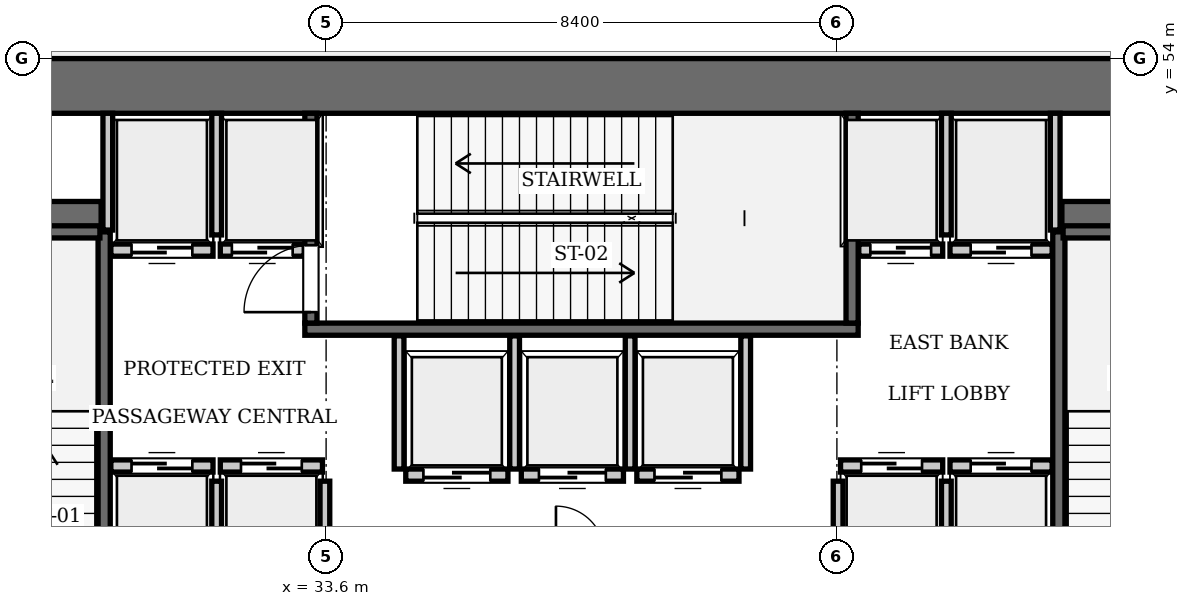
"""IFC4 building model, lengths in metres.
Left out: names, types, materials, properties, quantities, classifications, styles, units other than length and angle.
Written with IfcOpenShell. Run it as: python <this file> out.ifc"""

import sys

from ifc_helpers import new_model, si_unit, direction, frame, frame_2d, origin, place, context, subcontext, project, spatial, rectangle, extrude, element, fill, save


model = new_model("IFC4")
c1 = context("Model", 3, precision=1e-05, world=origin(), true_north=direction((0.0, 1.0)))
c2 = subcontext(c1, "Body", "Model", "MODEL_VIEW")
j1 = project(units=[si_unit("LENGTHUNIT", "METRE"), si_unit("PLANEANGLEUNIT", "RADIAN")], contexts=[c1])
p1 = place(None, origin())
s1 = spatial("IfcSite", under=j1, at=p1, CompositionType="ELEMENT")
p2 = place(p1, origin())
s2 = spatial("IfcBuilding", under=s1, at=p2, CompositionType="ELEMENT")
p3 = place(p2, origin())
s3 = spatial("IfcBuildingStorey", under=s2, at=p3, CompositionType="ELEMENT", Elevation=0.0)
p4 = place(p3, frame((25.2, 53.55, 0.0), z_axis=(0.0, 0.0, 1.0), x_axis=(1.0, 0.0, 0.0)))
e1 = element("IfcWall", 1, at=p4, inside=s3, PredefinedType="SHEAR", context=c2, shape_type="SweptSolid", body=[
    extrude(rectangle(XDim=25.2, YDim=0.9, at=frame_2d((12.6, 0.0))), origin(), (0.0, 0.0, 1.0), 5.6),
])
p5 = place(p3, frame((26.1, 51.4, 0.0), z_axis=(0.0, 0.0, 1.0), x_axis=(1.0, 0.0, 0.0)))
e2 = element("IfcWall", 2, at=p5, inside=s3, PredefinedType="SHEAR", context=c2, shape_type="SweptSolid", body=[
    extrude(rectangle(XDim=3.8, YDim=0.5, at=frame_2d((1.9, 0.0))), origin(), (0.0, 0.0, 1.0), 5.6),
])
p6 = place(p3, frame((45.7, 51.4, 0.0), z_axis=(0.0, 0.0, 1.0), x_axis=(1.0, 0.0, 0.0)))
e3 = element("IfcWall", 3, at=p6, inside=s3, PredefinedType="SHEAR", context=c2, shape_type="SweptSolid", body=[
    extrude(rectangle(XDim=3.8, YDim=0.5, at=frame_2d((1.9, 0.0))), origin(), (0.0, 0.0, 1.0), 5.6),
])
p7 = place(p3, frame((29.95, 42.3, 0.0), z_axis=(0.0, 0.0, 1.0), x_axis=(0.0, 1.0, 0.0)))
e4 = element("IfcWall", 4, at=p7, inside=s3, PredefinedType="SOLIDWALL", context=c2, shape_type="SweptSolid", body=[
    extrude(rectangle(XDim=8.85, YDim=0.2, at=frame_2d((4.425, 0.0))), origin(), (0.0, 0.0, 1.0), 5.32),
])
p8 = place(p3, frame((26.38, 51.15, 0.0), z_axis=(0.0, 0.0, 1.0), x_axis=(1.0, 0.0, 0.0)))
e5 = element("IfcWall", 5, at=p8, inside=s3, PredefinedType="SOLIDWALL", context=c2, shape_type="SweptSolid", body=[
    extrude(rectangle(XDim=3.5, YDim=0.2, at=frame_2d((1.75, 0.0))), origin(), (0.0, 0.0, 1.0), 5.32),
])
p9 = place(p3, frame((33.25, 49.55, 0.0), z_axis=(0.0, 0.0, 1.0), x_axis=(1.0, 0.0, 0.0)))
e6 = element("IfcWall", 6, at=p9, inside=s3, PredefinedType="SOLIDWALL", context=c2, shape_type="SweptSolid", body=[
    extrude(rectangle(XDim=9.1, YDim=0.2, at=frame_2d((4.55, 0.0))), origin(), (0.0, 0.0, 1.0), 5.32),
])
p10 = place(p3, frame((42.25, 49.65, 0.0), z_axis=(0.0, 0.0, 1.0), x_axis=(0.0, 1.0, 0.0)))
e7 = element("IfcWall", 7, at=p10, inside=s3, PredefinedType="SOLIDWALL", context=c2, shape_type="SweptSolid", body=[
    extrude(rectangle(XDim=3.45, YDim=0.2, at=frame_2d((1.725, 0.0))), origin(), (0.0, 0.0, 1.0), 5.32),
])
p11 = place(p3, frame((33.35, 49.65, 0.0), z_axis=(0.0, 0.0, 1.0), x_axis=(0.0, 1.0, 0.0)))
e8 = element("IfcWall", 8, at=p11, inside=s3, PredefinedType="SOLIDWALL", context=c2, shape_type="SweptSolid", body=[
    extrude(rectangle(XDim=3.45, YDim=0.2, at=frame_2d((1.725, 0.0))), origin(), (0.0, 0.0, 1.0), 5.32),
])
p12 = place(p11, frame((0.18, 0.0, 0.0)))
e9 = element("IfcOpeningElement", 9, at=p12, cuts=e8, PredefinedType="OPENING", context=c2, shape_type="SweptSolid", body=[
    extrude(rectangle(XDim=1.1, YDim=2.15, at=frame_2d((0.55, 1.075))), frame((0.0, 0.11, 0.0), z_axis=(0.0, -1.0, 0.0), x_axis=(1.0, 0.0, 0.0)), (0.0, 0.0, 1.0), 0.22),
])
p13 = place(p3, frame((45.65, 42.3, 0.0), z_axis=(0.0, 0.0, 1.0), x_axis=(0.0, 1.0, 0.0)))
e10 = element("IfcWall", 10, at=p13, inside=s3, PredefinedType="SOLIDWALL", context=c2, shape_type="SweptSolid", body=[
    extrude(rectangle(XDim=8.85, YDim=0.2, at=frame_2d((4.425, 0.0))), origin(), (0.0, 0.0, 1.0), 5.32),
])
p14 = place(p3, frame((45.72, 51.15, 0.0), z_axis=(0.0, 0.0, 1.0), x_axis=(1.0, 0.0, 0.0)))
e11 = element("IfcWall", 11, at=p14, inside=s3, PredefinedType="SOLIDWALL", context=c2, shape_type="SweptSolid", body=[
    extrude(rectangle(XDim=3.5, YDim=0.2, at=frame_2d((1.75, 0.0))), origin(), (0.0, 0.0, 1.0), 5.32),
])
p15 = place(p3, frame((30.06, 47.3, 0.0), z_axis=(0.0, 0.0, 1.0), x_axis=(1.0, 0.0, 0.0)))
e12 = element("IfcWall", 12, at=p15, inside=s3, PredefinedType="SOLIDWALL", context=c2, shape_type="SweptSolid", body=[
    extrude(rectangle(XDim=1.68, YDim=0.2, at=frame_2d((0.84, 0.0))), origin(), (0.0, 0.0, 1.0), 5.32),
])
p16 = place(p15, frame((0.34, 0.0, 0.0)))
e13 = element("IfcOpeningElement", 13, at=p16, cuts=e12, PredefinedType="OPENING", context=c2, shape_type="SweptSolid", body=[
    extrude(rectangle(XDim=1.0, YDim=2.15, at=frame_2d((0.5, 1.075))), frame((0.0, 0.11, 0.0), z_axis=(0.0, -1.0, 0.0), x_axis=(1.0, 0.0, 0.0)), (0.0, 0.0, 1.0), 0.22),
])
p17 = place(p3, frame((31.86, 47.3, 0.0), z_axis=(0.0, 0.0, 1.0), x_axis=(1.0, 0.0, 0.0)))
e14 = element("IfcWall", 14, at=p17, inside=s3, PredefinedType="SOLIDWALL", context=c2, shape_type="SweptSolid", body=[
    extrude(rectangle(XDim=1.68, YDim=0.2, at=frame_2d((0.84, 0.0))), origin(), (0.0, 0.0, 1.0), 5.32),
])
p18 = place(p17, frame((0.34, 0.0, 0.0)))
e15 = element("IfcOpeningElement", 15, at=p18, cuts=e14, PredefinedType="OPENING", context=c2, shape_type="SweptSolid", body=[
    extrude(rectangle(XDim=1.0, YDim=2.15, at=frame_2d((0.5, 1.075))), frame((0.0, 0.11, 0.0), z_axis=(0.0, -1.0, 0.0), x_axis=(1.0, 0.0, 0.0)), (0.0, 0.0, 1.0), 0.22),
])
p19 = place(p3, frame((30.06, 50.85, 0.0), z_axis=(0.0, 0.0, 1.0), x_axis=(1.0, 0.0, 0.0)))
e16 = element("IfcWall", 16, at=p19, inside=s3, PredefinedType="SOLIDWALL", context=c2, shape_type="SweptSolid", body=[
    extrude(rectangle(XDim=1.68, YDim=0.2, at=frame_2d((0.84, 0.0))), origin(), (0.0, 0.0, 1.0), 5.32),
])
p20 = place(p19, frame((0.34, 0.0, 0.0)))
e17 = element("IfcOpeningElement", 17, at=p20, cuts=e16, PredefinedType="OPENING", context=c2, shape_type="SweptSolid", body=[
    extrude(rectangle(XDim=1.0, YDim=2.15, at=frame_2d((0.5, 1.075))), frame((0.0, 0.11, 0.0), z_axis=(0.0, -1.0, 0.0), x_axis=(1.0, 0.0, 0.0)), (0.0, 0.0, 1.0), 0.22),
])
p21 = place(p3, frame((31.86, 50.85, 0.0), z_axis=(0.0, 0.0, 1.0), x_axis=(1.0, 0.0, 0.0)))
e18 = element("IfcWall", 18, at=p21, inside=s3, PredefinedType="SOLIDWALL", context=c2, shape_type="SweptSolid", body=[
    extrude(rectangle(XDim=1.38, YDim=0.2, at=frame_2d((0.69, 0.0))), origin(), (0.0, 0.0, 1.0), 5.32),
])
p22 = place(p21, frame((0.19, 0.0, 0.0)))
e19 = element("IfcOpeningElement", 19, at=p22, cuts=e18, PredefinedType="OPENING", context=c2, shape_type="SweptSolid", body=[
    extrude(rectangle(XDim=1.0, YDim=2.15, at=frame_2d((0.5, 1.075))), frame((0.0, 0.11, 0.0), z_axis=(0.0, -1.0, 0.0), x_axis=(1.0, 0.0, 0.0)), (0.0, 0.0, 1.0), 0.22),
])
p23 = place(p3, frame((42.06, 47.3, 0.0), z_axis=(0.0, 0.0, 1.0), x_axis=(1.0, 0.0, 0.0)))
e20 = element("IfcWall", 20, at=p23, inside=s3, PredefinedType="SOLIDWALL", context=c2, shape_type="SweptSolid", body=[
    extrude(rectangle(XDim=1.68, YDim=0.2, at=frame_2d((0.84, 0.0))), origin(), (0.0, 0.0, 1.0), 5.32),
])
p24 = place(p23, frame((0.34, 0.0, 0.0)))
e21 = element("IfcOpeningElement", 21, at=p24, cuts=e20, PredefinedType="OPENING", context=c2, shape_type="SweptSolid", body=[
    extrude(rectangle(XDim=1.0, YDim=2.15, at=frame_2d((0.5, 1.075))), frame((0.0, 0.11, 0.0), z_axis=(0.0, -1.0, 0.0), x_axis=(1.0, 0.0, 0.0)), (0.0, 0.0, 1.0), 0.22),
])
p25 = place(p3, frame((43.86, 47.3, 0.0), z_axis=(0.0, 0.0, 1.0), x_axis=(1.0, 0.0, 0.0)))
e22 = element("IfcWall", 22, at=p25, inside=s3, PredefinedType="SOLIDWALL", context=c2, shape_type="SweptSolid", body=[
    extrude(rectangle(XDim=1.68, YDim=0.2, at=frame_2d((0.84, 0.0))), origin(), (0.0, 0.0, 1.0), 5.32),
])
p26 = place(p25, frame((0.34, 0.0, 0.0)))
e23 = element("IfcOpeningElement", 23, at=p26, cuts=e22, PredefinedType="OPENING", context=c2, shape_type="SweptSolid", body=[
    extrude(rectangle(XDim=1.0, YDim=2.15, at=frame_2d((0.5, 1.075))), frame((0.0, 0.11, 0.0), z_axis=(0.0, -1.0, 0.0), x_axis=(1.0, 0.0, 0.0)), (0.0, 0.0, 1.0), 0.22),
])
p27 = place(p3, frame((42.36, 50.85, 0.0), z_axis=(0.0, 0.0, 1.0), x_axis=(1.0, 0.0, 0.0)))
e24 = element("IfcWall", 24, at=p27, inside=s3, PredefinedType="SOLIDWALL", context=c2, shape_type="SweptSolid", body=[
    extrude(rectangle(XDim=1.38, YDim=0.2, at=frame_2d((0.69, 0.0))), origin(), (0.0, 0.0, 1.0), 5.32),
])
p28 = place(p27, frame((0.19, 0.0, 0.0)))
e25 = element("IfcOpeningElement", 25, at=p28, cuts=e24, PredefinedType="OPENING", context=c2, shape_type="SweptSolid", body=[
    extrude(rectangle(XDim=1.0, YDim=2.15, at=frame_2d((0.5, 1.075))), frame((0.0, 0.11, 0.0), z_axis=(0.0, -1.0, 0.0), x_axis=(1.0, 0.0, 0.0)), (0.0, 0.0, 1.0), 0.22),
])
p29 = place(p3, frame((43.86, 50.85, 0.0), z_axis=(0.0, 0.0, 1.0), x_axis=(1.0, 0.0, 0.0)))
e26 = element("IfcWall", 26, at=p29, inside=s3, PredefinedType="SOLIDWALL", context=c2, shape_type="SweptSolid", body=[
    extrude(rectangle(XDim=1.68, YDim=0.2, at=frame_2d((0.84, 0.0))), origin(), (0.0, 0.0, 1.0), 5.32),
])
p30 = place(p29, frame((0.34, 0.0, 0.0)))
e27 = element("IfcOpeningElement", 27, at=p30, cuts=e26, PredefinedType="OPENING", context=c2, shape_type="SweptSolid", body=[
    extrude(rectangle(XDim=1.0, YDim=2.15, at=frame_2d((0.5, 1.075))), frame((0.0, 0.11, 0.0), z_axis=(0.0, -1.0, 0.0), x_axis=(1.0, 0.0, 0.0)), (0.0, 0.0, 1.0), 0.22),
])
p31 = place(p3, frame((34.91, 47.15, 0.0), z_axis=(0.0, 0.0, 1.0), x_axis=(1.0, 0.0, 0.0)))
e28 = element("IfcWall", 28, at=p31, inside=s3, PredefinedType="SOLIDWALL", context=c2, shape_type="SweptSolid", body=[
    extrude(rectangle(XDim=1.68, YDim=0.2, at=frame_2d((0.84, 0.0))), origin(), (0.0, 0.0, 1.0), 5.32),
])
p32 = place(p31, frame((0.29, 0.0, 0.0)))
e29 = element("IfcOpeningElement", 29, at=p32, cuts=e28, PredefinedType="OPENING", context=c2, shape_type="SweptSolid", body=[
    extrude(rectangle(XDim=1.1, YDim=2.2, at=frame_2d((0.55, 1.1))), frame((0.0, 0.11, 0.0), z_axis=(0.0, -1.0, 0.0), x_axis=(1.0, 0.0, 0.0)), (0.0, 0.0, 1.0), 0.22),
])
p33 = place(p3, frame((36.81, 47.15, 0.0), z_axis=(0.0, 0.0, 1.0), x_axis=(1.0, 0.0, 0.0)))
e30 = element("IfcWall", 30, at=p33, inside=s3, PredefinedType="SOLIDWALL", context=c2, shape_type="SweptSolid", body=[
    extrude(rectangle(XDim=1.68, YDim=0.2, at=frame_2d((0.84, 0.0))), origin(), (0.0, 0.0, 1.0), 5.32),
])
p34 = place(p33, frame((0.29, 0.0, 0.0)))
e31 = element("IfcOpeningElement", 31, at=p34, cuts=e30, PredefinedType="OPENING", context=c2, shape_type="SweptSolid", body=[
    extrude(rectangle(XDim=1.1, YDim=2.2, at=frame_2d((0.55, 1.1))), frame((0.0, 0.11, 0.0), z_axis=(0.0, -1.0, 0.0), x_axis=(1.0, 0.0, 0.0)), (0.0, 0.0, 1.0), 0.22),
])
p35 = place(p3, frame((38.71, 47.15, 0.0), z_axis=(0.0, 0.0, 1.0), x_axis=(1.0, 0.0, 0.0)))
e32 = element("IfcWall", 32, at=p35, inside=s3, PredefinedType="SOLIDWALL", context=c2, shape_type="SweptSolid", body=[
    extrude(rectangle(XDim=1.68, YDim=0.2, at=frame_2d((0.84, 0.0))), origin(), (0.0, 0.0, 1.0), 5.32),
])
p36 = place(p35, frame((0.29, 0.0, 0.0)))
e33 = element("IfcOpeningElement", 33, at=p36, cuts=e32, PredefinedType="OPENING", context=c2, shape_type="SweptSolid", body=[
    extrude(rectangle(XDim=1.1, YDim=2.2, at=frame_2d((0.55, 1.1))), frame((0.0, 0.11, 0.0), z_axis=(0.0, -1.0, 0.0), x_axis=(1.0, 0.0, 0.0)), (0.0, 0.0, 1.0), 0.22),
])
for number, where, z_axis, x_axis in (
    (34, (31.8, 45.1, 0.0), (0.0, 0.0, 1.0), (0.0, 1.0, 0.0)),
    (35, (33.58, 45.1, 0.0), (0.0, 0.0, 1.0), (0.0, 1.0, 0.0)),
):
    element("IfcWall", number, at=place(p3, frame(where, z_axis=z_axis, x_axis=x_axis)), inside=s3, PredefinedType="SOLIDWALL", context=c2, shape_type="SweptSolid", body=[
        extrude(rectangle(XDim=1.95, YDim=0.16, at=frame_2d((0.975, 0.0))), origin(), (0.0, 0.0, 1.0), 5.32),
    ])
p37 = place(p3, frame((30.01, 51.18, 0.0), z_axis=(0.0, 0.0, 1.0), x_axis=(0.0, 1.0, 0.0)))
e36 = element("IfcWall", 36, at=p37, inside=s3, PredefinedType="SOLIDWALL", context=c2, shape_type="SweptSolid", body=[
    extrude(rectangle(XDim=1.92, YDim=0.16, at=frame_2d((0.96, 0.0))), origin(), (0.0, 0.0, 1.0), 5.32),
])
p38 = place(p3, frame((31.8, 51.1, 0.0), z_axis=(0.0, 0.0, 1.0), x_axis=(0.0, 1.0, 0.0)))
e37 = element("IfcWall", 37, at=p38, inside=s3, PredefinedType="SOLIDWALL", context=c2, shape_type="SweptSolid", body=[
    extrude(rectangle(XDim=2.0, YDim=0.16, at=frame_2d((1.0, 0.0))), origin(), (0.0, 0.0, 1.0), 5.32),
])
for number, where, z_axis, x_axis in (
    (38, (42.02, 45.1, 0.0), (0.0, 0.0, 1.0), (0.0, 1.0, 0.0)),
    (39, (43.8, 45.1, 0.0), (0.0, 0.0, 1.0), (0.0, 1.0, 0.0)),
):
    element("IfcWall", number, at=place(p3, frame(where, z_axis=z_axis, x_axis=x_axis)), inside=s3, PredefinedType="SOLIDWALL", context=c2, shape_type="SweptSolid", body=[
        extrude(rectangle(XDim=1.95, YDim=0.16, at=frame_2d((0.975, 0.0))), origin(), (0.0, 0.0, 1.0), 5.32),
    ])
p39 = place(p3, frame((45.59, 51.18, 0.0), z_axis=(0.0, 0.0, 1.0), x_axis=(0.0, 1.0, 0.0)))
e40 = element("IfcWall", 40, at=p39, inside=s3, PredefinedType="SOLIDWALL", context=c2, shape_type="SweptSolid", body=[
    extrude(rectangle(XDim=1.92, YDim=0.16, at=frame_2d((0.96, 0.0))), origin(), (0.0, 0.0, 1.0), 5.32),
])
p40 = place(p3, frame((43.8, 51.1, 0.0), z_axis=(0.0, 0.0, 1.0), x_axis=(0.0, 1.0, 0.0)))
e41 = element("IfcWall", 41, at=p40, inside=s3, PredefinedType="SOLIDWALL", context=c2, shape_type="SweptSolid", body=[
    extrude(rectangle(XDim=2.0, YDim=0.16, at=frame_2d((1.0, 0.0))), origin(), (0.0, 0.0, 1.0), 5.32),
])
for number, where, z_axis, x_axis in (
    (42, (34.8, 47.25, 0.0), (0.0, 0.0, 1.0), (0.0, 1.0, 0.0)),
    (43, (36.7, 47.25, 0.0), (0.0, 0.0, 1.0), (0.0, 1.0, 0.0)),
    (44, (38.6, 47.25, 0.0), (0.0, 0.0, 1.0), (0.0, 1.0, 0.0)),
    (45, (40.5, 47.25, 0.0), (0.0, 0.0, 1.0), (0.0, 1.0, 0.0)),
):
    element("IfcWall", number, at=place(p3, frame(where, z_axis=z_axis, x_axis=x_axis)), inside=s3, PredefinedType="SOLIDWALL", context=c2, shape_type="SweptSolid", body=[
        extrude(rectangle(XDim=2.19, YDim=0.16, at=frame_2d((1.095, 0.0))), origin(), (0.0, 0.0, 1.0), 5.32),
    ])
p41 = place(p12, origin())
e46 = element("IfcDoor", 46, at=p41, inside=s3, OperationType="SINGLE_SWING_LEFT", PredefinedType="DOOR", context=c2, shape_type="SweptSolid", body=[
    extrude(rectangle(XDim=1.1, YDim=2.15, at=frame_2d((0.55, 1.075))), frame((0.0, 0.025, 0.0), z_axis=(0.0, -1.0, 0.0), x_axis=(1.0, 0.0, 0.0)), (0.0, 0.0, 1.0), 0.05),
])
fill(e9, e46)
p42 = place(p16, origin())
e47 = element("IfcDoor", 47, at=p42, inside=s3, OperationType="SLIDING_TO_LEFT", PredefinedType="DOOR", context=c2, shape_type="SweptSolid", body=[
    extrude(rectangle(XDim=1.0, YDim=2.15, at=frame_2d((0.5, 1.075))), frame((0.0, 0.025, 0.0), z_axis=(0.0, -1.0, 0.0), x_axis=(1.0, 0.0, 0.0)), (0.0, 0.0, 1.0), 0.05),
])
fill(e13, e47)
p43 = place(p18, origin())
e48 = element("IfcDoor", 48, at=p43, inside=s3, OperationType="SLIDING_TO_LEFT", PredefinedType="DOOR", context=c2, shape_type="SweptSolid", body=[
    extrude(rectangle(XDim=1.0, YDim=2.15, at=frame_2d((0.5, 1.075))), frame((0.0, 0.025, 0.0), z_axis=(0.0, -1.0, 0.0), x_axis=(1.0, 0.0, 0.0)), (0.0, 0.0, 1.0), 0.05),
])
fill(e15, e48)
p44 = place(p20, frame((1.0, 0.0, 0.0), z_axis=(0.0, 0.0, 1.0), x_axis=(-1.0, 0.0, 0.0)))
e49 = element("IfcDoor", 49, at=p44, inside=s3, OperationType="SLIDING_TO_LEFT", PredefinedType="DOOR", context=c2, shape_type="SweptSolid", body=[
    extrude(rectangle(XDim=1.0, YDim=2.15, at=frame_2d((0.5, 1.075))), frame((0.0, 0.025, 0.0), z_axis=(0.0, -1.0, 0.0), x_axis=(1.0, 0.0, 0.0)), (0.0, 0.0, 1.0), 0.05),
])
fill(e17, e49)
p45 = place(p22, frame((1.0, 0.0, 0.0), z_axis=(0.0, 0.0, 1.0), x_axis=(-1.0, 0.0, 0.0)))
e50 = element("IfcDoor", 50, at=p45, inside=s3, OperationType="SLIDING_TO_LEFT", PredefinedType="DOOR", context=c2, shape_type="SweptSolid", body=[
    extrude(rectangle(XDim=1.0, YDim=2.15, at=frame_2d((0.5, 1.075))), frame((0.0, 0.025, 0.0), z_axis=(0.0, -1.0, 0.0), x_axis=(1.0, 0.0, 0.0)), (0.0, 0.0, 1.0), 0.05),
])
fill(e19, e50)
p46 = place(p24, origin())
e51 = element("IfcDoor", 51, at=p46, inside=s3, OperationType="SLIDING_TO_LEFT", PredefinedType="DOOR", context=c2, shape_type="SweptSolid", body=[
    extrude(rectangle(XDim=1.0, YDim=2.15, at=frame_2d((0.5, 1.075))), frame((0.0, 0.025, 0.0), z_axis=(0.0, -1.0, 0.0), x_axis=(1.0, 0.0, 0.0)), (0.0, 0.0, 1.0), 0.05),
])
fill(e21, e51)
p47 = place(p26, origin())
e52 = element("IfcDoor", 52, at=p47, inside=s3, OperationType="SLIDING_TO_LEFT", PredefinedType="DOOR", context=c2, shape_type="SweptSolid", body=[
    extrude(rectangle(XDim=1.0, YDim=2.15, at=frame_2d((0.5, 1.075))), frame((0.0, 0.025, 0.0), z_axis=(0.0, -1.0, 0.0), x_axis=(1.0, 0.0, 0.0)), (0.0, 0.0, 1.0), 0.05),
])
fill(e23, e52)
p48 = place(p28, frame((1.0, 0.0, 0.0), z_axis=(0.0, 0.0, 1.0), x_axis=(-1.0, 0.0, 0.0)))
e53 = element("IfcDoor", 53, at=p48, inside=s3, OperationType="SLIDING_TO_LEFT", PredefinedType="DOOR", context=c2, shape_type="SweptSolid", body=[
    extrude(rectangle(XDim=1.0, YDim=2.15, at=frame_2d((0.5, 1.075))), frame((0.0, 0.025, 0.0), z_axis=(0.0, -1.0, 0.0), x_axis=(1.0, 0.0, 0.0)), (0.0, 0.0, 1.0), 0.05),
])
fill(e25, e53)
p49 = place(p30, frame((1.0, 0.0, 0.0), z_axis=(0.0, 0.0, 1.0), x_axis=(-1.0, 0.0, 0.0)))
e54 = element("IfcDoor", 54, at=p49, inside=s3, OperationType="SLIDING_TO_LEFT", PredefinedType="DOOR", context=c2, shape_type="SweptSolid", body=[
    extrude(rectangle(XDim=1.0, YDim=2.15, at=frame_2d((0.5, 1.075))), frame((0.0, 0.025, 0.0), z_axis=(0.0, -1.0, 0.0), x_axis=(1.0, 0.0, 0.0)), (0.0, 0.0, 1.0), 0.05),
])
fill(e27, e54)
p50 = place(p32, frame((1.1, 0.0, 0.0), z_axis=(0.0, 0.0, 1.0), x_axis=(-1.0, 0.0, 0.0)))
e55 = element("IfcDoor", 55, at=p50, inside=s3, OperationType="SLIDING_TO_RIGHT", PredefinedType="DOOR", context=c2, shape_type="SweptSolid", body=[
    extrude(rectangle(XDim=1.1, YDim=2.2, at=frame_2d((0.55, 1.1))), frame((0.0, 0.025, 0.0), z_axis=(0.0, -1.0, 0.0), x_axis=(1.0, 0.0, 0.0)), (0.0, 0.0, 1.0), 0.05),
])
fill(e29, e55)
p51 = place(p34, frame((1.1, 0.0, 0.0), z_axis=(0.0, 0.0, 1.0), x_axis=(-1.0, 0.0, 0.0)))
e56 = element("IfcDoor", 56, at=p51, inside=s3, OperationType="SLIDING_TO_RIGHT", PredefinedType="DOOR", context=c2, shape_type="SweptSolid", body=[
    extrude(rectangle(XDim=1.1, YDim=2.2, at=frame_2d((0.55, 1.1))), frame((0.0, 0.025, 0.0), z_axis=(0.0, -1.0, 0.0), x_axis=(1.0, 0.0, 0.0)), (0.0, 0.0, 1.0), 0.05),
])
fill(e31, e56)
p52 = place(p36, frame((1.1, 0.0, 0.0), z_axis=(0.0, 0.0, 1.0), x_axis=(-1.0, 0.0, 0.0)))
e57 = element("IfcDoor", 57, at=p52, inside=s3, OperationType="SLIDING_TO_RIGHT", PredefinedType="DOOR", context=c2, shape_type="SweptSolid", body=[
    extrude(rectangle(XDim=1.1, YDim=2.2, at=frame_2d((0.55, 1.1))), frame((0.0, 0.025, 0.0), z_axis=(0.0, -1.0, 0.0), x_axis=(1.0, 0.0, 0.0)), (0.0, 0.0, 1.0), 0.05),
])
fill(e33, e57)
save(model, sys.argv[1])
